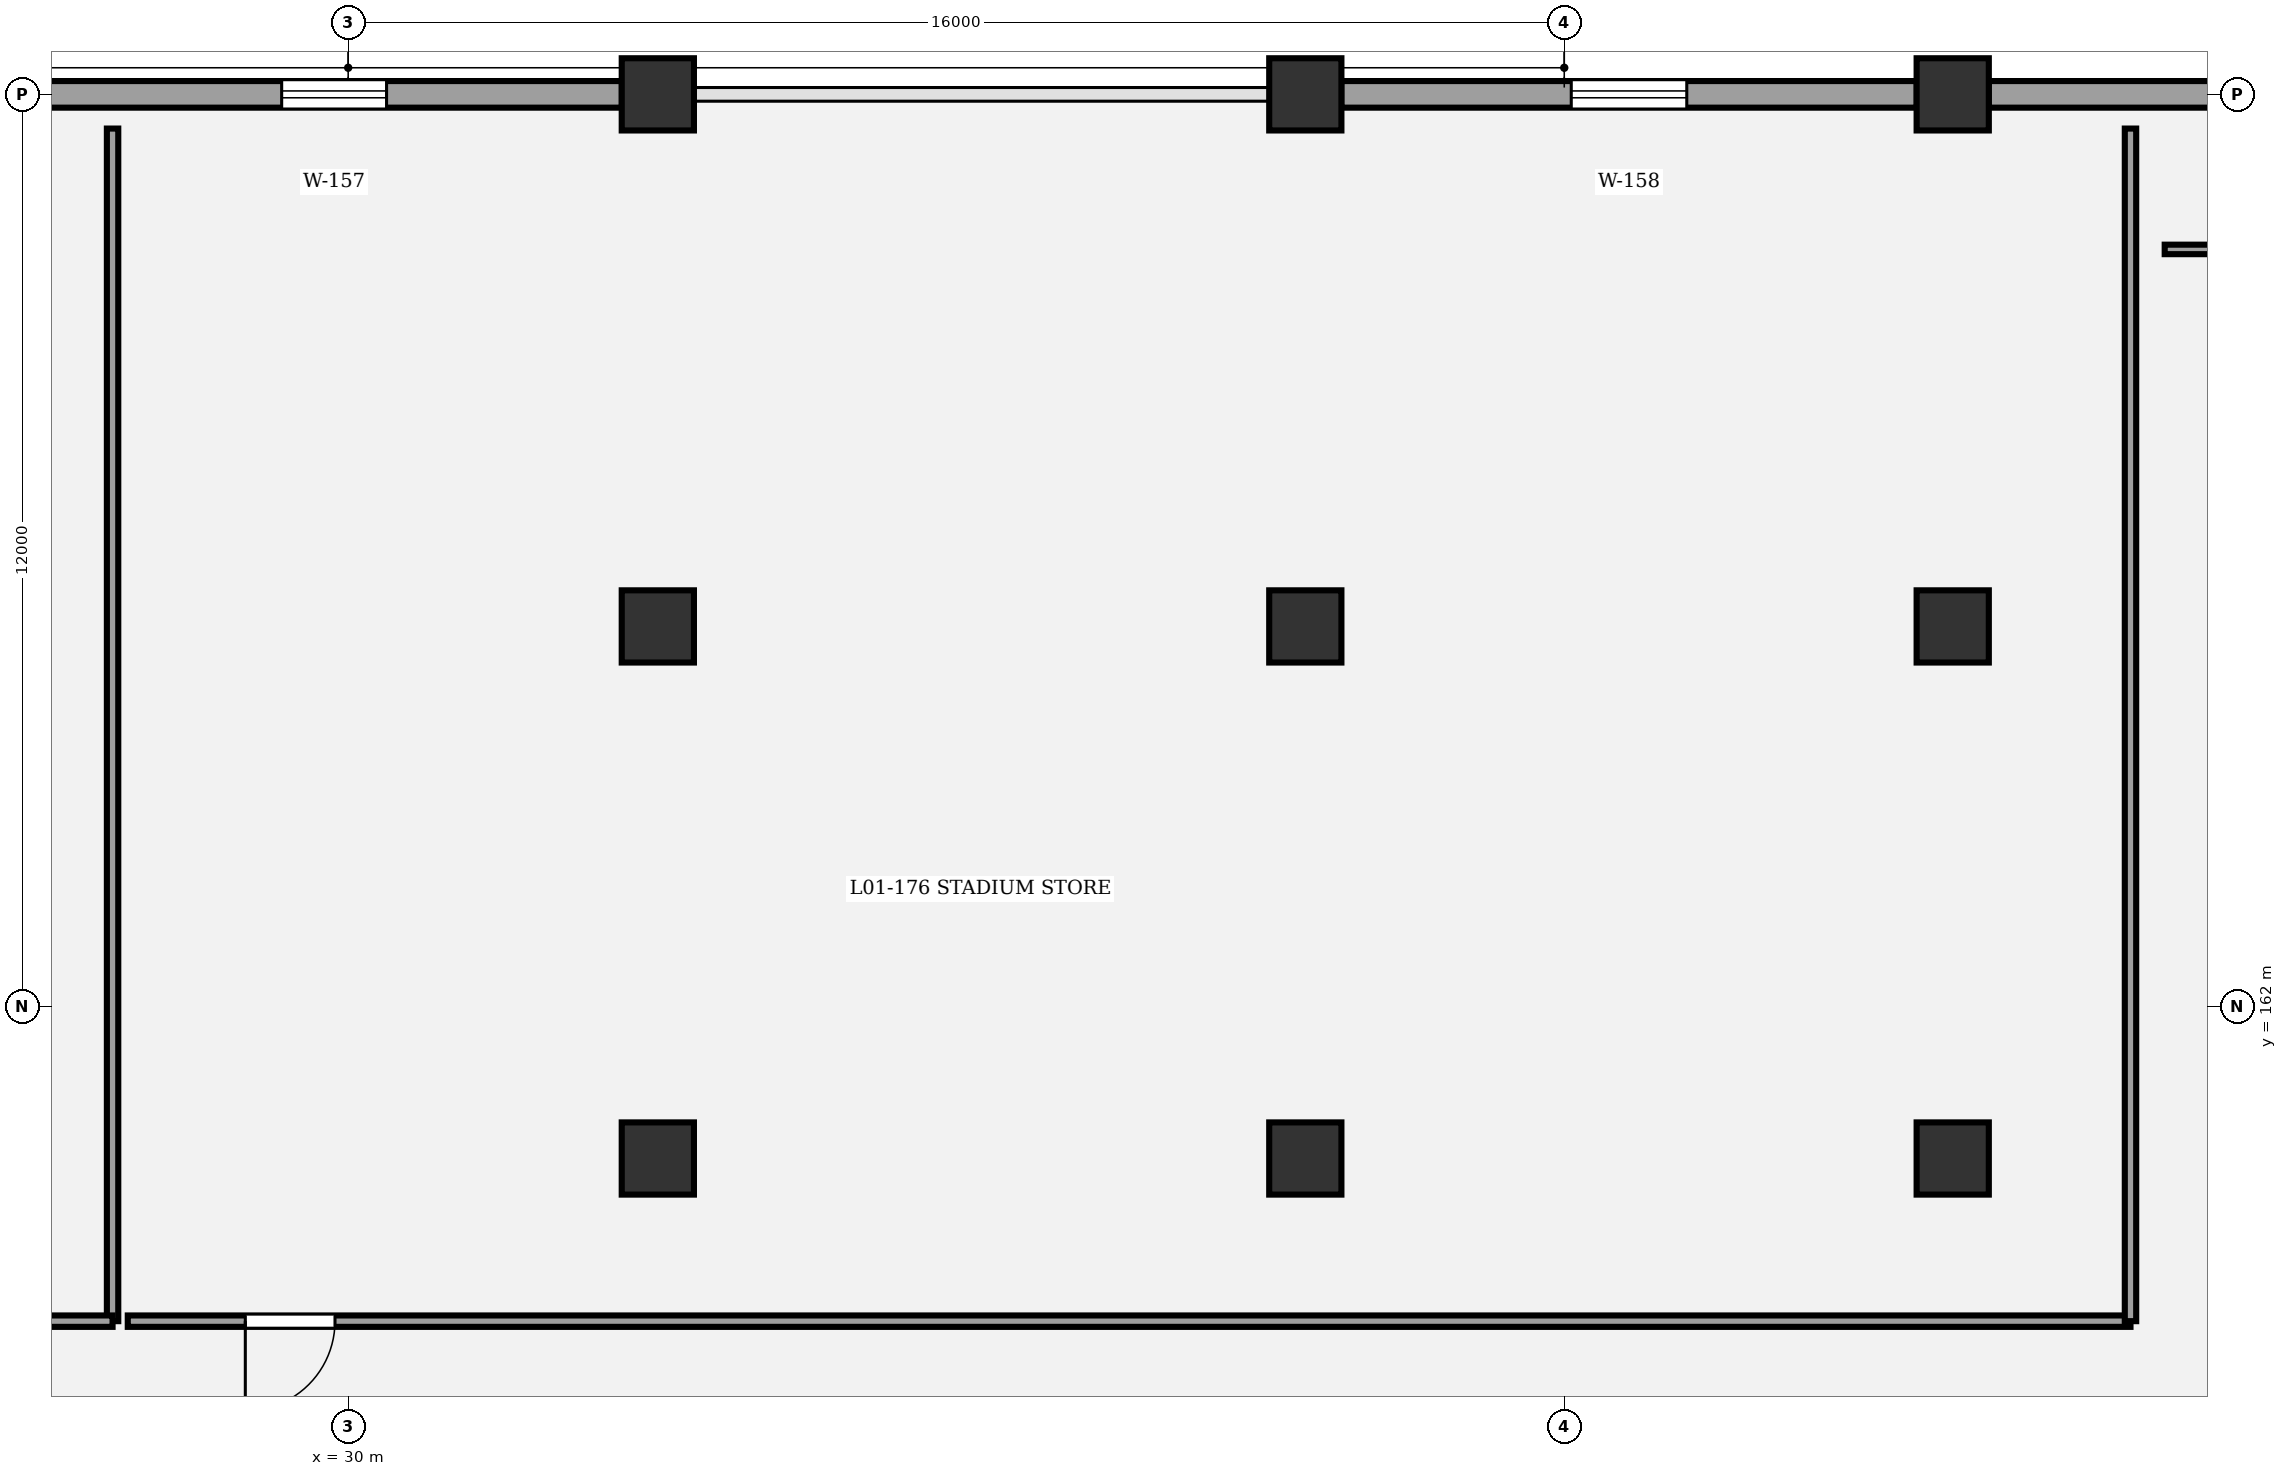
"""IFC4 building model, lengths in metres.
Left out: names, types, materials, properties, quantities, classifications, styles, units other than length and angle.
Written with IfcOpenShell. Run it as: python <this file> out.ifc"""

import sys

from ifc_helpers import new_model, si_unit, direction, frame, frame_2d, origin, origin_2d, place, context, subcontext, project, spatial, rectangle, circle, extrude, element, fill, save


model = new_model("IFC4")
c1 = context("Model", 3, precision=1e-05, world=origin(), true_north=direction((0.0, 1.0)))
c2 = subcontext(c1, "Body", "Model", "MODEL_VIEW")
j1 = project(units=[si_unit("LENGTHUNIT", "METRE"), si_unit("PLANEANGLEUNIT", "RADIAN")], contexts=[c1])
p1 = place(None, origin())
s1 = spatial("IfcSite", under=j1, at=p1, CompositionType="ELEMENT")
p2 = place(p1, origin())
s2 = spatial("IfcBuilding", under=s1, at=p2, CompositionType="ELEMENT")
p3 = place(p2, frame((0.0, 0.0, 5.4)))
s3 = spatial("IfcBuildingStorey", under=s2, at=p3, CompositionType="ELEMENT", Elevation=5.4)
for number, where, z_axis, x_axis in (
    (1, (34.074, 160.0, 0.0), (0.0, 0.0, 1.0), (1.0, 0.0, 0.0)),
    (2, (34.074, 167.0, 0.0), (0.0, 0.0, 1.0), (1.0, 0.0, 0.0)),
    (3, (34.074, 174.0, 0.0), (0.0, 0.0, 1.0), (1.0, 0.0, 0.0)),
    (4, (42.593, 160.0, 0.0), (0.0, 0.0, 1.0), (1.0, 0.0, 0.0)),
    (5, (42.593, 167.0, 0.0), (0.0, 0.0, 1.0), (1.0, 0.0, 0.0)),
    (6, (42.593, 174.0, 0.0), (0.0, 0.0, 1.0), (1.0, 0.0, 0.0)),
    (7, (51.111, 160.0, 0.0), (0.0, 0.0, 1.0), (1.0, 0.0, 0.0)),
    (8, (51.111, 167.0, 0.0), (0.0, 0.0, 1.0), (1.0, 0.0, 0.0)),
    (9, (51.111, 174.0, 0.0), (0.0, 0.0, 1.0), (1.0, 0.0, 0.0)),
):
    element("IfcColumn", number, at=place(p3, frame(where, z_axis=z_axis, x_axis=x_axis)), inside=s3, PredefinedType="COLUMN", context=c2, shape_type="SweptSolid", body=[
        extrude(circle(Radius=0.475, at=origin_2d()), origin(), (0.0, 0.0, 1.0), 4.8),
    ])
p4 = place(p3, frame((26.029, 174.0, 0.0), z_axis=(0.0, 0.0, 1.0), x_axis=(1.0, 0.0, 0.0)))
e10 = element("IfcWall", 10, at=p4, inside=s3, PredefinedType="STANDARD", context=c2, shape_type="SweptSolid", body=[
    extrude(rectangle(XDim=7.572, YDim=0.35, at=frame_2d((3.786, 0.0))), origin(), (0.0, 0.0, 1.0), 3.56),
])
p5 = place(p4, frame((3.096, 0.0, 0.9)))
e11 = element("IfcOpeningElement", 11, at=p5, cuts=e10, PredefinedType="OPENING", context=c2, shape_type="SweptSolid", body=[
    extrude(rectangle(XDim=1.38, YDim=1.95, at=frame_2d((0.69, 0.975))), frame((0.0, 0.185, 0.0), z_axis=(0.0, -1.0, 0.0), x_axis=(1.0, 0.0, 0.0)), (0.0, 0.0, 1.0), 0.37),
])
p6 = place(p3, frame((43.066, 174.0, 0.0), z_axis=(0.0, 0.0, 1.0), x_axis=(1.0, 0.0, 0.0)))
e12 = element("IfcWall", 12, at=p6, inside=s3, PredefinedType="STANDARD", context=c2, shape_type="SweptSolid", body=[
    extrude(rectangle(XDim=7.572, YDim=0.35, at=frame_2d((3.786, 0.0))), origin(), (0.0, 0.0, 1.0), 3.56),
])
p7 = place(p6, frame((3.026, 0.0, 0.9)))
e13 = element("IfcOpeningElement", 13, at=p7, cuts=e12, PredefinedType="OPENING", context=c2, shape_type="SweptSolid", body=[
    extrude(rectangle(XDim=1.52, YDim=1.95, at=frame_2d((0.76, 0.975))), frame((0.0, 0.185, 0.0), z_axis=(0.0, -1.0, 0.0), x_axis=(1.0, 0.0, 0.0)), (0.0, 0.0, 1.0), 0.37),
])
p8 = place(p3, frame((51.584, 174.0, 0.0), z_axis=(0.0, 0.0, 1.0), x_axis=(1.0, 0.0, 0.0)))
e14 = element("IfcWall", 14, at=p8, inside=s3, PredefinedType="STANDARD", context=c2, shape_type="SweptSolid", body=[
    extrude(rectangle(XDim=7.573, YDim=0.35, at=frame_2d((3.787, 0.0))), origin(), (0.0, 0.0, 1.0), 3.56),
])
p9 = place(p8, frame((2.957, 0.0, 0.9)))
e15 = element("IfcOpeningElement", 15, at=p9, cuts=e14, PredefinedType="OPENING", context=c2, shape_type="SweptSolid", body=[
    extrude(rectangle(XDim=1.66, YDim=1.95, at=frame_2d((0.83, 0.975))), frame((0.0, 0.185, 0.0), z_axis=(0.0, -1.0, 0.0), x_axis=(1.0, 0.0, 0.0)), (0.0, 0.0, 1.0), 0.37),
])
p10 = place(p3, frame((53.45, 157.86, 0.0), z_axis=(0.0, 0.0, 1.0), x_axis=(-1.0, 0.0, 0.0)))
e16 = element("IfcWall", 16, at=p10, inside=s3, PredefinedType="PARTITIONING", context=c2, shape_type="SweptSolid", body=[
    extrude(rectangle(XDim=26.35, YDim=0.15, at=frame_2d((13.175, 0.0))), origin(), (0.0, 0.0, 1.0), 3.55),
])
p11 = place(p10, frame((23.624, 0.0, 0.0)))
e17 = element("IfcOpeningElement", 17, at=p11, cuts=e16, PredefinedType="OPENING", context=c2, shape_type="SweptSolid", body=[
    extrude(rectangle(XDim=1.18, YDim=2.1, at=frame_2d((0.59, 1.05))), frame((0.0, 0.085, 0.0), z_axis=(0.0, -1.0, 0.0), x_axis=(1.0, 0.0, 0.0)), (0.0, 0.0, 1.0), 0.17),
])
p12 = place(p3, frame((80.0, 171.96, 0.0), z_axis=(0.0, 0.0, 1.0), x_axis=(-1.0, 0.0, 0.0)))
e18 = element("IfcWall", 18, at=p12, inside=s3, PredefinedType="PARTITIONING", context=c2, shape_type="SweptSolid", body=[
    extrude(rectangle(XDim=26.1, YDim=0.125, at=frame_2d((13.05, 0.0))), origin(), (0.0, 0.0, 1.0), 3.55),
])
p13 = place(p12, frame((16.076, 0.0, 0.0)))
e19 = element("IfcOpeningElement", 19, at=p13, cuts=e18, PredefinedType="OPENING", context=c2, shape_type="SweptSolid", body=[
    extrude(rectangle(XDim=1.22, YDim=2.1, at=frame_2d((0.61, 1.05))), frame((0.0, 0.073, 0.0), z_axis=(0.0, -1.0, 0.0), x_axis=(1.0, 0.0, 0.0)), (0.0, 0.0, 1.0), 0.145),
])
p14 = place(p3, frame((26.9, 173.55, 0.0), z_axis=(0.0, 0.0, 1.0), x_axis=(0.0, -1.0, 0.0)))
e20 = element("IfcWall", 20, at=p14, inside=s3, PredefinedType="PARTITIONING", context=c2, shape_type="SweptSolid", body=[
    extrude(rectangle(XDim=15.69, YDim=0.15, at=frame_2d((7.845, 0.0))), origin(), (0.0, 0.0, 1.0), 3.55),
])
p15 = place(p3, frame((26.9, 157.86, 0.0), z_axis=(0.0, 0.0, 1.0), x_axis=(-1.0, 0.0, 0.0)))
e21 = element("IfcWall", 21, at=p15, inside=s3, PredefinedType="PARTITIONING", context=c2, shape_type="SweptSolid", body=[
    extrude(rectangle(XDim=13.4, YDim=0.15, at=frame_2d((6.7, 0.0))), origin(), (0.0, 0.0, 1.0), 3.55),
])
p16 = place(p3, frame((53.45, 173.55, 0.0), z_axis=(0.0, 0.0, 1.0), x_axis=(0.0, -1.0, 0.0)))
e22 = element("IfcWall", 22, at=p16, inside=s3, PredefinedType="PARTITIONING", context=c2, shape_type="SweptSolid", body=[
    extrude(rectangle(XDim=15.69, YDim=0.15, at=frame_2d((7.845, 0.0))), origin(), (0.0, 0.0, 1.0), 3.55),
])
p17 = place(p5, origin())
e23 = element("IfcWindow", 23, at=p17, inside=s3, PartitioningType="SINGLE_PANEL", PredefinedType="WINDOW", context=c2, shape_type="SweptSolid", body=[
    extrude(rectangle(XDim=1.38, YDim=1.95, at=frame_2d((0.69, 0.975))), frame((0.0, 0.03, 0.0), z_axis=(0.0, -1.0, 0.0), x_axis=(1.0, 0.0, 0.0)), (0.0, 0.0, 1.0), 0.06),
])
fill(e11, e23)
p18 = place(p7, origin())
e24 = element("IfcWindow", 24, at=p18, inside=s3, PartitioningType="SINGLE_PANEL", PredefinedType="WINDOW", context=c2, shape_type="SweptSolid", body=[
    extrude(rectangle(XDim=1.52, YDim=1.95, at=frame_2d((0.76, 0.975))), frame((0.0, 0.03, 0.0), z_axis=(0.0, -1.0, 0.0), x_axis=(1.0, 0.0, 0.0)), (0.0, 0.0, 1.0), 0.06),
])
fill(e13, e24)
p19 = place(p11, origin())
e25 = element("IfcDoor", 25, at=p19, inside=s3, OperationType="SINGLE_SWING_RIGHT", PredefinedType="DOOR", context=c2, shape_type="SweptSolid", body=[
    extrude(rectangle(XDim=1.18, YDim=2.1, at=frame_2d((0.59, 1.05))), frame((0.0, 0.025, 0.0), z_axis=(0.0, -1.0, 0.0), x_axis=(1.0, 0.0, 0.0)), (0.0, 0.0, 1.0), 0.05),
])
fill(e17, e25)
save(model, sys.argv[1])
